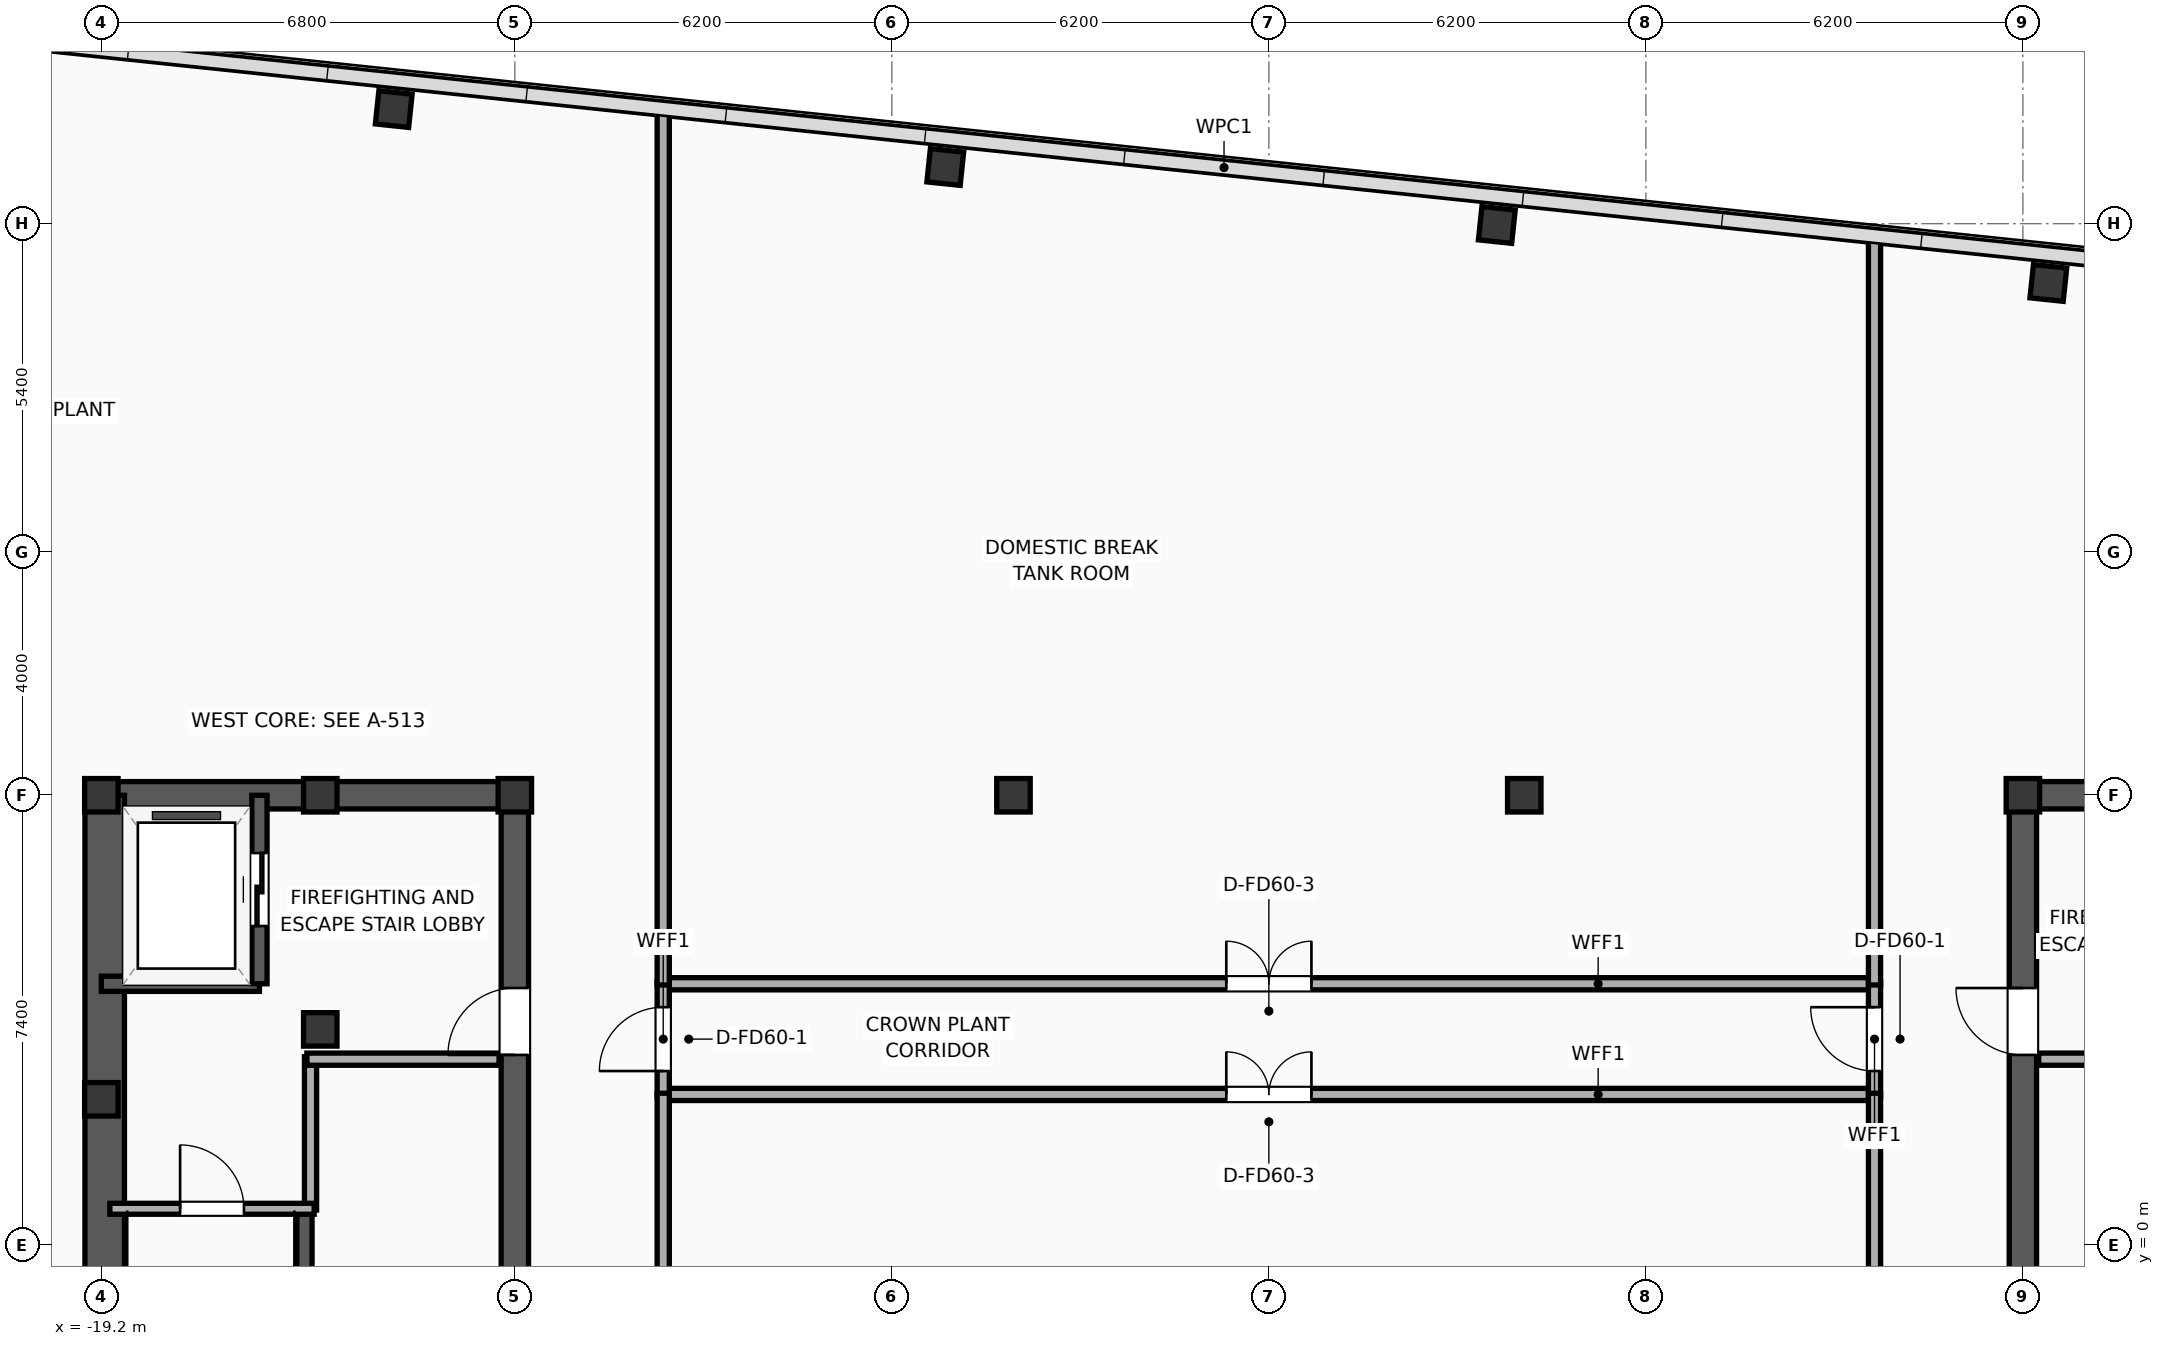
"""IFC4 building model, lengths in metres.
Left out: names, types, materials, properties, quantities, classifications, styles, units other than length and angle.
Written with IfcOpenShell. Run it as: python <this file> out.ifc"""

import sys

from ifc_helpers import new_model, si_unit, direction, frame, frame_2d, origin, origin_2d, place, context, subcontext, project, spatial, rectangle, hollow_rectangle, extrude, element, fill, save


model = new_model("IFC4")
c1 = context("Model", 3, precision=1e-05, world=origin(), true_north=direction((0.0, 1.0)))
c2 = subcontext(c1, "Body", "Model", "MODEL_VIEW")
j1 = project(units=[si_unit("LENGTHUNIT", "METRE"), si_unit("PLANEANGLEUNIT", "RADIAN")], contexts=[c1])
p1 = place(None, origin())
s1 = spatial("IfcSite", under=j1, at=p1, CompositionType="ELEMENT")
p2 = place(p1, origin())
s2 = spatial("IfcBuilding", under=s1, at=p2, CompositionType="ELEMENT")
p3 = place(p2, frame((0.0, 0.0, 321.3)))
s3 = spatial("IfcBuildingStorey", under=s2, at=p3, CompositionType="ELEMENT", Elevation=321.3)
for number, where, z_axis, x_axis in (
    (1, (-19.2, 2.4, 0.0), (0.0, 0.0, 1.0), (1.0, 0.0, 0.0)),
    (2, (-19.2, 7.4, 0.0), (0.0, 0.0, 1.0), (1.0, 0.0, 0.0)),
    (3, (-15.6, 7.4, 0.0), (0.0, 0.0, 1.0), (1.0, 0.0, 0.0)),
    (4, (-15.6, 3.55, 0.0), (0.0, 0.0, 1.0), (1.0, 0.0, 0.0)),
    (5, (-12.4, 7.4, 0.0), (0.0, 0.0, 1.0), (1.0, 0.0, 0.0)),
    (6, (12.4, 7.4, 0.0), (0.0, 0.0, 1.0), (1.0, 0.0, 0.0)),
):
    element("IfcColumn", number, at=place(p3, frame(where, z_axis=z_axis, x_axis=x_axis)), inside=s3, PredefinedType="COLUMN", context=c2, shape_type="SweptSolid", body=[
        extrude(hollow_rectangle(XDim=0.55, YDim=0.55, WallThickness=0.022, at=origin_2d()), origin(), (0.0, 0.0, 1.0), 5.3),
    ])
p4 = place(p3, frame((-19.425, 7.4, 0.0), z_axis=(0.0, 0.0, 1.0), x_axis=(1.0, 0.0, 0.0)))
e7 = element("IfcWall", 7, at=p4, inside=s3, PredefinedType="SHEAR", context=c2, shape_type="SweptSolid", body=[
    extrude(rectangle(XDim=7.25, YDim=0.45, at=frame_2d((3.625, 0.0))), origin(), (0.0, 0.0, 1.0), 5.025),
])
p5 = place(p3, frame((-19.145, -7.4, 0.0), z_axis=(0.0, 0.0, 1.0), x_axis=(0.0, 1.0, 0.0)))
e8 = element("IfcWall", 8, at=p5, inside=s3, PredefinedType="SHEAR", context=c2, shape_type="SweptSolid", body=[
    extrude(rectangle(XDim=14.8, YDim=0.65, at=frame_2d((7.4, 0.0))), origin(), (0.0, 0.0, 1.0), 5.025),
])
p6 = place(p3, frame((-12.4, -7.4, 0.0), z_axis=(0.0, 0.0, 1.0), x_axis=(0.0, 1.0, 0.0)))
e9 = element("IfcWall", 9, at=p6, inside=s3, PredefinedType="SHEAR", context=c2, shape_type="SweptSolid", body=[
    extrude(rectangle(XDim=14.8, YDim=0.45, at=frame_2d((7.4, 0.0))), origin(), (0.0, 0.0, 1.0), 5.025),
])
p7 = place(p6, frame((10.53, 0.0, 0.0)))
e10 = element("IfcOpeningElement", 10, at=p7, cuts=e9, PredefinedType="OPENING", context=c2, shape_type="SweptSolid", body=[
    extrude(rectangle(XDim=1.1, YDim=2.05, at=frame_2d((0.55, 1.025))), frame((0.0, 0.235, 0.0), z_axis=(0.0, -1.0, 0.0), x_axis=(1.0, 0.0, 0.0)), (0.0, 0.0, 1.0), 0.47),
])
p8 = place(p6, frame((4.45, 0.0, 0.0)))
e11 = element("IfcOpeningElement", 11, at=p8, cuts=e9, PredefinedType="OPENING", context=c2, shape_type="SweptSolid", body=[
    extrude(rectangle(XDim=0.9, YDim=2.05, at=frame_2d((0.45, 1.025))), frame((0.0, 0.235, 0.0), z_axis=(0.0, -1.0, 0.0), x_axis=(1.0, 0.0, 0.0)), (0.0, 0.0, 1.0), 0.47),
])
p9 = place(p3, frame((-15.86, -7.085, 0.0), z_axis=(0.0, 0.0, 1.0), x_axis=(0.0, 1.0, 0.0)))
e12 = element("IfcWall", 12, at=p9, inside=s3, PredefinedType="SOLIDWALL", context=c2, shape_type="SweptSolid", body=[
    extrude(rectangle(XDim=7.685, YDim=0.25, at=frame_2d((3.843, 0.0))), origin(), (0.0, 0.0, 1.0), 5.025),
])
p10 = place(p3, frame((12.175, 7.4, 0.0), z_axis=(0.0, 0.0, 1.0), x_axis=(1.0, 0.0, 0.0)))
e13 = element("IfcWall", 13, at=p10, inside=s3, PredefinedType="SHEAR", context=c2, shape_type="SweptSolid", body=[
    extrude(rectangle(XDim=7.25, YDim=0.45, at=frame_2d((3.625, 0.0))), origin(), (0.0, 0.0, 1.0), 5.025),
])
p11 = place(p3, frame((12.4, -7.4, 0.0), z_axis=(0.0, 0.0, 1.0), x_axis=(0.0, 1.0, 0.0)))
e14 = element("IfcWall", 14, at=p11, inside=s3, PredefinedType="SHEAR", context=c2, shape_type="SweptSolid", body=[
    extrude(rectangle(XDim=14.8, YDim=0.45, at=frame_2d((7.4, 0.0))), origin(), (0.0, 0.0, 1.0), 5.025),
])
p12 = place(p11, frame((10.53, 0.0, 0.0)))
e15 = element("IfcOpeningElement", 15, at=p12, cuts=e14, PredefinedType="OPENING", context=c2, shape_type="SweptSolid", body=[
    extrude(rectangle(XDim=1.1, YDim=2.05, at=frame_2d((0.55, 1.025))), frame((0.0, 0.235, 0.0), z_axis=(0.0, -1.0, 0.0), x_axis=(1.0, 0.0, 0.0)), (0.0, 0.0, 1.0), 0.47),
])
p13 = place(p11, frame((4.45, 0.0, 0.0)))
e16 = element("IfcOpeningElement", 16, at=p13, cuts=e14, PredefinedType="OPENING", context=c2, shape_type="SweptSolid", body=[
    extrude(rectangle(XDim=0.9, YDim=2.05, at=frame_2d((0.45, 1.025))), frame((0.0, 0.235, 0.0), z_axis=(0.0, -1.0, 0.0), x_axis=(1.0, 0.0, 0.0)), (0.0, 0.0, 1.0), 0.47),
])
for number, where, z_axis, x_axis in (
    (17, (-4.2, 7.4, 0.0), (0.0, 0.0, 1.0), (1.0, 0.0, 0.0)),
    (18, (4.2, 7.4, 0.0), (0.0, 0.0, 1.0), (1.0, 0.0, 0.0)),
    (19, (12.819, 15.825, 0.0), (0.0, 0.0, 1.0), (0.995, -0.105, 0.0)),
    (20, (3.749, 16.778, 0.0), (0.0, 0.0, 1.0), (0.995, -0.105, 0.0)),
    (21, (-5.322, 17.732, 0.0), (0.0, 0.0, 1.0), (0.995, -0.105, 0.0)),
    (22, (-14.392, 18.685, 0.0), (0.0, 0.0, 1.0), (0.995, -0.105, 0.0)),
):
    element("IfcColumn", number, at=place(p3, frame(where, z_axis=z_axis, x_axis=x_axis)), inside=s3, PredefinedType="COLUMN", context=c2, shape_type="SweptSolid", body=[
        extrude(hollow_rectangle(XDim=0.55, YDim=0.55, WallThickness=0.022, at=origin_2d()), origin(), (0.0, 0.0, 1.0), 5.3),
    ])
p14 = place(p3, frame((-23.395, 20.104, 0.0), z_axis=(0.0, 0.0, 1.0), x_axis=(0.994522116558, -0.104526358762, 0.0)))
e23 = element("IfcWall", 23, at=p14, inside=s3, PredefinedType="PARAPET", context=c2, shape_type="SweptSolid", body=[
    extrude(rectangle(XDim=45.564, YDim=0.22, at=frame_2d((22.782, 0.0))), origin(), (0.0, 0.0, 1.0), 1.2),
])
p15 = place(p3, frame((-19.2, 4.3, 0.0), z_axis=(0.0, 0.0, 1.0), x_axis=(1.0, 0.0, 0.0)))
e24 = element("IfcWall", 24, at=p15, inside=s3, PredefinedType="SOLIDWALL", context=c2, shape_type="SweptSolid", body=[
    extrude(rectangle(XDim=2.6, YDim=0.25, at=frame_2d((1.3, 0.0))), origin(), (0.0, 0.0, 1.0), 5.025),
])
p16 = place(p3, frame((-16.6, 4.3, 0.0), z_axis=(0.0, 0.0, 1.0), x_axis=(0.0, 1.0, 0.0)))
e25 = element("IfcWall", 25, at=p16, inside=s3, PredefinedType="SOLIDWALL", context=c2, shape_type="SweptSolid", body=[
    extrude(rectangle(XDim=3.1, YDim=0.25, at=frame_2d((1.55, 0.0))), origin(), (0.0, 0.0, 1.0), 5.025),
])
p17 = place(p16, frame((0.95, 0.0, 0.0)))
e26 = element("IfcOpeningElement", 26, at=p17, cuts=e25, PredefinedType="OPENING", context=c2, shape_type="SweptSolid", body=[
    extrude(rectangle(XDim=1.2, YDim=2.05, at=frame_2d((0.6, 1.025))), frame((0.0, 0.135, 0.0), z_axis=(0.0, -1.0, 0.0), x_axis=(1.0, 0.0, 0.0)), (0.0, 0.0, 1.0), 0.27),
])
p18 = place(p3, frame((-15.76, 0.58, 0.0), z_axis=(0.0, 0.0, 1.0), x_axis=(0.0, 1.0, 0.0)))
e27 = element("IfcWall", 27, at=p18, inside=s3, PredefinedType="PARTITIONING", context=c2, shape_type="SweptSolid", body=[
    extrude(rectangle(XDim=2.52, YDim=0.2, at=frame_2d((1.26, 0.0))), origin(), (0.0, 0.0, 1.0), 5.025),
])
p19 = place(p3, frame((-15.82, 3.06, 0.0), z_axis=(0.0, 0.0, 1.0), x_axis=(1.0, 0.0, 0.0)))
e28 = element("IfcWall", 28, at=p19, inside=s3, PredefinedType="PARTITIONING", context=c2, shape_type="SweptSolid", body=[
    extrude(rectangle(XDim=3.16, YDim=0.2, at=frame_2d((1.58, 0.0))), origin(), (0.0, 0.0, 1.0), 5.025),
])
p20 = place(p3, frame((-19.06, 0.6, 0.0), z_axis=(0.0, 0.0, 1.0), x_axis=(1.0, 0.0, 0.0)))
e29 = element("IfcWall", 29, at=p20, inside=s3, PredefinedType="PARTITIONING", context=c2, shape_type="SweptSolid", body=[
    extrude(rectangle(XDim=3.36, YDim=0.18, at=frame_2d((1.68, 0.0))), origin(), (0.0, 0.0, 1.0), 5.025),
])
p21 = place(p20, frame((1.155, 0.0, 0.0)))
e30 = element("IfcOpeningElement", 30, at=p21, cuts=e29, PredefinedType="OPENING", context=c2, shape_type="SweptSolid", body=[
    extrude(rectangle(XDim=1.05, YDim=2.05, at=frame_2d((0.525, 1.025))), frame((0.0, 0.1, 0.0), z_axis=(0.0, -1.0, 0.0), x_axis=(1.0, 0.0, 0.0)), (0.0, 0.0, 1.0), 0.2),
])
p22 = place(p3, frame((12.66, 3.06, 0.0), z_axis=(0.0, 0.0, 1.0), x_axis=(1.0, 0.0, 0.0)))
e31 = element("IfcWall", 31, at=p22, inside=s3, PredefinedType="PARTITIONING", context=c2, shape_type="SweptSolid", body=[
    extrude(rectangle(XDim=3.16, YDim=0.2, at=frame_2d((1.58, 0.0))), origin(), (0.0, 0.0, 1.0), 5.025),
])
p23 = place(p3, frame((-9.98, 2.48, 0.0), z_axis=(0.0, 0.0, 1.0), x_axis=(1.0, 0.0, 0.0)))
e32 = element("IfcWall", 32, at=p23, inside=s3, PredefinedType="PARTITIONING", context=c2, shape_type="SweptSolid", body=[
    extrude(rectangle(XDim=19.96, YDim=0.2, at=frame_2d((9.98, 0.0))), origin(), (0.0, 0.0, 1.0), 4.595),
])
p24 = place(p23, frame((9.28, 0.0, 0.0)))
e33 = element("IfcOpeningElement", 33, at=p24, cuts=e32, PredefinedType="OPENING", context=c2, shape_type="SweptSolid", body=[
    extrude(rectangle(XDim=1.4, YDim=2.05, at=frame_2d((0.7, 1.025))), frame((0.0, 0.11, 0.0), z_axis=(0.0, -1.0, 0.0), x_axis=(1.0, 0.0, 0.0)), (0.0, 0.0, 1.0), 0.22),
])
p25 = place(p3, frame((-9.98, 4.3, 0.0), z_axis=(0.0, 0.0, 1.0), x_axis=(1.0, 0.0, 0.0)))
e34 = element("IfcWall", 34, at=p25, inside=s3, PredefinedType="PARTITIONING", context=c2, shape_type="SweptSolid", body=[
    extrude(rectangle(XDim=19.96, YDim=0.2, at=frame_2d((9.98, 0.0))), origin(), (0.0, 0.0, 1.0), 5.025),
])
p26 = place(p25, frame((9.28, 0.0, 0.0)))
e35 = element("IfcOpeningElement", 35, at=p26, cuts=e34, PredefinedType="OPENING", context=c2, shape_type="SweptSolid", body=[
    extrude(rectangle(XDim=1.4, YDim=2.05, at=frame_2d((0.7, 1.025))), frame((0.0, 0.11, 0.0), z_axis=(0.0, -1.0, 0.0), x_axis=(1.0, 0.0, 0.0)), (0.0, 0.0, 1.0), 0.22),
])
p27 = place(p3, frame((-9.96, 2.44, 0.0), z_axis=(0.0, 0.0, 1.0), x_axis=(0.0, 1.0, 0.0)))
e36 = element("IfcWall", 36, at=p27, inside=s3, PredefinedType="PARTITIONING", context=c2, shape_type="SweptSolid", body=[
    extrude(rectangle(XDim=1.9, YDim=0.2, at=frame_2d((0.95, 0.0))), origin(), (0.0, 0.0, 1.0), 5.025),
])
p28 = place(p27, frame((0.425, 0.0, 0.0)))
e37 = element("IfcOpeningElement", 37, at=p28, cuts=e36, PredefinedType="OPENING", context=c2, shape_type="SweptSolid", body=[
    extrude(rectangle(XDim=1.05, YDim=2.05, at=frame_2d((0.525, 1.025))), frame((0.0, 0.11, 0.0), z_axis=(0.0, -1.0, 0.0), x_axis=(1.0, 0.0, 0.0)), (0.0, 0.0, 1.0), 0.22),
])
p29 = place(p3, frame((9.96, 2.44, 0.0), z_axis=(0.0, 0.0, 1.0), x_axis=(0.0, 1.0, 0.0)))
e38 = element("IfcWall", 38, at=p29, inside=s3, PredefinedType="PARTITIONING", context=c2, shape_type="SweptSolid", body=[
    extrude(rectangle(XDim=1.9, YDim=0.2, at=frame_2d((0.95, 0.0))), origin(), (0.0, 0.0, 1.0), 5.025),
])
p30 = place(p29, frame((0.425, 0.0, 0.0)))
e39 = element("IfcOpeningElement", 39, at=p30, cuts=e38, PredefinedType="OPENING", context=c2, shape_type="SweptSolid", body=[
    extrude(rectangle(XDim=1.05, YDim=2.05, at=frame_2d((0.525, 1.025))), frame((0.0, 0.11, 0.0), z_axis=(0.0, -1.0, 0.0), x_axis=(1.0, 0.0, 0.0)), (0.0, 0.0, 1.0), 0.22),
])
p31 = place(p3, frame((-9.96, -17.125, 0.0), z_axis=(0.0, 0.0, 1.0), x_axis=(0.0, 1.0, 0.0)))
e40 = element("IfcWall", 40, at=p31, inside=s3, PredefinedType="PARTITIONING", context=c2, shape_type="SweptSolid", body=[
    extrude(rectangle(XDim=19.625, YDim=0.2, at=frame_2d((9.812, 0.0))), origin(), (0.0, 0.0, 1.0), 4.465),
])
p32 = place(p3, frame((-9.96, 4.28, 0.0), z_axis=(0.0, 0.0, 1.0), x_axis=(0.0, 1.0, 0.0)))
e41 = element("IfcWall", 41, at=p32, inside=s3, PredefinedType="PARTITIONING", context=c2, shape_type="SweptSolid", body=[
    extrude(rectangle(XDim=14.392, YDim=0.2, at=frame_2d((7.196, 0.0))), origin(), (0.0, 0.0, 1.0), 5.025),
])
p33 = place(p3, frame((9.96, -19.218, 0.0), z_axis=(0.0, 0.0, 1.0), x_axis=(0.0, 1.0, 0.0)))
e42 = element("IfcWall", 42, at=p33, inside=s3, PredefinedType="PARTITIONING", context=c2, shape_type="SweptSolid", body=[
    extrude(rectangle(XDim=21.718, YDim=0.2, at=frame_2d((10.859, 0.0))), origin(), (0.0, 0.0, 1.0), 4.465),
])
p34 = place(p3, frame((9.96, 4.28, 0.0), z_axis=(0.0, 0.0, 1.0), x_axis=(0.0, 1.0, 0.0)))
e43 = element("IfcWall", 43, at=p34, inside=s3, PredefinedType="PARTITIONING", context=c2, shape_type="SweptSolid", body=[
    extrude(rectangle(XDim=12.298, YDim=0.2, at=frame_2d((6.149, 0.0))), origin(), (0.0, 0.0, 1.0), 5.025),
])
p35 = place(p17, origin())
e44 = element("IfcDoor", 44, at=p35, inside=s3, OperationType="SLIDING_TO_LEFT", PredefinedType="DOOR", context=c2, shape_type="SweptSolid", body=[
    extrude(rectangle(XDim=1.2, YDim=2.05, at=frame_2d((0.6, 1.025))), frame((0.0, 0.025, 0.0), z_axis=(0.0, -1.0, 0.0), x_axis=(1.0, 0.0, 0.0)), (0.0, 0.0, 1.0), 0.05),
])
fill(e26, e44)
p36 = place(p21, origin())
e45 = element("IfcDoor", 45, at=p36, inside=s3, OperationType="SINGLE_SWING_LEFT", PredefinedType="DOOR", context=c2, shape_type="SweptSolid", body=[
    extrude(rectangle(XDim=1.05, YDim=2.05, at=frame_2d((0.525, 1.025))), frame((0.0, 0.025, 0.0), z_axis=(0.0, -1.0, 0.0), x_axis=(1.0, 0.0, 0.0)), (0.0, 0.0, 1.0), 0.05),
])
fill(e30, e45)
p37 = place(p24, origin())
e46 = element("IfcDoor", 46, at=p37, inside=s3, OperationType="DOUBLE_DOOR_SINGLE_SWING", PredefinedType="DOOR", context=c2, shape_type="SweptSolid", body=[
    extrude(rectangle(XDim=1.4, YDim=2.05, at=frame_2d((0.7, 1.025))), frame((0.0, 0.025, 0.0), z_axis=(0.0, -1.0, 0.0), x_axis=(1.0, 0.0, 0.0)), (0.0, 0.0, 1.0), 0.05),
])
fill(e33, e46)
p38 = place(p26, origin())
e47 = element("IfcDoor", 47, at=p38, inside=s3, OperationType="DOUBLE_DOOR_SINGLE_SWING", PredefinedType="DOOR", context=c2, shape_type="SweptSolid", body=[
    extrude(rectangle(XDim=1.4, YDim=2.05, at=frame_2d((0.7, 1.025))), frame((0.0, 0.025, 0.0), z_axis=(0.0, -1.0, 0.0), x_axis=(1.0, 0.0, 0.0)), (0.0, 0.0, 1.0), 0.05),
])
fill(e35, e47)
p39 = place(p28, origin())
e48 = element("IfcDoor", 48, at=p39, inside=s3, OperationType="SINGLE_SWING_LEFT", PredefinedType="DOOR", context=c2, shape_type="SweptSolid", body=[
    extrude(rectangle(XDim=1.05, YDim=2.05, at=frame_2d((0.525, 1.025))), frame((0.0, 0.025, 0.0), z_axis=(0.0, -1.0, 0.0), x_axis=(1.0, 0.0, 0.0)), (0.0, 0.0, 1.0), 0.05),
])
fill(e37, e48)
p40 = place(p30, origin())
e49 = element("IfcDoor", 49, at=p40, inside=s3, OperationType="SINGLE_SWING_RIGHT", PredefinedType="DOOR", context=c2, shape_type="SweptSolid", body=[
    extrude(rectangle(XDim=1.05, YDim=2.05, at=frame_2d((0.525, 1.025))), frame((0.0, 0.025, 0.0), z_axis=(0.0, -1.0, 0.0), x_axis=(1.0, 0.0, 0.0)), (0.0, 0.0, 1.0), 0.05),
])
fill(e39, e49)
p41 = place(p7, origin())
e50 = element("IfcDoor", 50, at=p41, inside=s3, OperationType="SINGLE_SWING_LEFT", PredefinedType="DOOR", context=c2, shape_type="SweptSolid", body=[
    extrude(rectangle(XDim=1.1, YDim=2.05, at=frame_2d((0.55, 1.025))), frame((0.0, 0.025, 0.0), z_axis=(0.0, -1.0, 0.0), x_axis=(1.0, 0.0, 0.0)), (0.0, 0.0, 1.0), 0.05),
])
fill(e10, e50)
p42 = place(p12, origin())
e51 = element("IfcDoor", 51, at=p42, inside=s3, OperationType="SINGLE_SWING_RIGHT", PredefinedType="DOOR", context=c2, shape_type="SweptSolid", body=[
    extrude(rectangle(XDim=1.1, YDim=2.05, at=frame_2d((0.55, 1.025))), frame((0.0, 0.025, 0.0), z_axis=(0.0, -1.0, 0.0), x_axis=(1.0, 0.0, 0.0)), (0.0, 0.0, 1.0), 0.05),
])
fill(e15, e51)
save(model, sys.argv[1])
